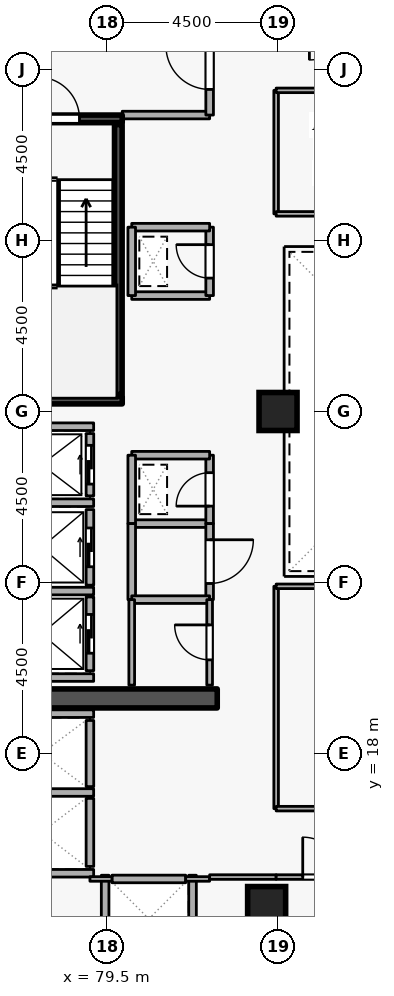
"""IFC4 building model, lengths in metres.
Left out: names, types, materials, properties, quantities, classifications, styles, units other than length and angle.
Written with IfcOpenShell. Run it as: python <this file> out.ifc"""

import sys

from ifc_helpers import new_model, si_unit, direction, frame, frame_2d, origin, origin_2d, place, context, subcontext, project, spatial, rectangle, extrude, element, fill, save


model = new_model("IFC4")
c1 = context("Model", 3, precision=1e-05, world=origin(), true_north=direction((0.0, 1.0)))
c2 = subcontext(c1, "Body", "Model", "MODEL_VIEW")
j1 = project(units=[si_unit("LENGTHUNIT", "METRE"), si_unit("PLANEANGLEUNIT", "RADIAN")], contexts=[c1])
p1 = place(None, origin())
s1 = spatial("IfcSite", under=j1, at=p1, CompositionType="ELEMENT")
p2 = place(p1, origin())
s2 = spatial("IfcBuilding", under=s1, at=p2, CompositionType="ELEMENT")
p3 = place(p2, frame((0.0, 0.0, 200.1)))
s3 = spatial("IfcBuildingStorey", under=s2, at=p3, CompositionType="ELEMENT", Elevation=200.1)
p4 = place(p3, frame((76.6, 19.45, 0.0), z_axis=(0.0, 0.0, 1.0), x_axis=(1.0, 0.0, 0.0)))
e1 = element("IfcWall", 1, at=p4, inside=s3, PredefinedType="SHEAR", context=c2, shape_type="SweptSolid", body=[
    extrude(rectangle(XDim=5.8, YDim=0.5, at=frame_2d((2.9, 0.0))), origin(), (0.0, 0.0, 1.0), 3.6),
])
for number, where, z_axis, x_axis in (
    (2, (83.7, 14.0, 0.0), (0.0, 0.0, 1.0), (1.0, 0.0, 0.0)),
    (3, (84.0, 27.0, 0.0), (0.0, 0.0, 1.0), (1.0, 0.0, 0.0)),
):
    element("IfcColumn", number, at=place(p3, frame(where, z_axis=z_axis, x_axis=x_axis)), inside=s3, PredefinedType="COLUMN", context=c2, shape_type="SweptSolid", body=[
        extrude(rectangle(XDim=1.0, YDim=1.0, at=origin_2d()), origin(), (0.0, 0.0, 1.0), 3.6),
    ])
p5 = place(p3, frame((79.05, 24.78, 0.0), z_axis=(0.0, 0.0, 1.0), x_axis=(0.0, 1.0, 0.0)))
e4 = element("IfcWall", 4, at=p5, inside=s3, PredefinedType="STANDARD", context=c2, shape_type="SweptSolid", body=[
    extrude(rectangle(XDim=1.64, YDim=0.2, at=frame_2d((0.82, 0.0))), origin(), (0.0, 0.0, 1.0), 3.32),
])
p6 = place(p5, frame((0.31, 0.0, 0.0)))
e5 = element("IfcOpeningElement", 5, at=p6, cuts=e4, PredefinedType="OPENING", context=c2, shape_type="SweptSolid", body=[
    extrude(rectangle(XDim=1.02, YDim=2.06, at=frame_2d((0.51, 1.03))), frame((0.0, 0.11, 0.0), z_axis=(0.0, -1.0, 0.0), x_axis=(1.0, 0.0, 0.0)), (0.0, 0.0, 1.0), 0.22),
])
p7 = place(p3, frame((79.05, 22.43, 0.0), z_axis=(0.0, 0.0, 1.0), x_axis=(0.0, 1.0, 0.0)))
e6 = element("IfcWall", 6, at=p7, inside=s3, PredefinedType="STANDARD", context=c2, shape_type="SweptSolid", body=[
    extrude(rectangle(XDim=1.99, YDim=0.2, at=frame_2d((0.995, 0.0))), origin(), (0.0, 0.0, 1.0), 3.32),
])
p8 = place(p7, frame((0.485, 0.0, 0.0)))
e7 = element("IfcOpeningElement", 7, at=p8, cuts=e6, PredefinedType="OPENING", context=c2, shape_type="SweptSolid", body=[
    extrude(rectangle(XDim=1.02, YDim=2.06, at=frame_2d((0.51, 1.03))), frame((0.0, 0.11, 0.0), z_axis=(0.0, -1.0, 0.0), x_axis=(1.0, 0.0, 0.0)), (0.0, 0.0, 1.0), 0.22),
])
p9 = place(p3, frame((79.05, 20.18, 0.0), z_axis=(0.0, 0.0, 1.0), x_axis=(0.0, 1.0, 0.0)))
e8 = element("IfcWall", 8, at=p9, inside=s3, PredefinedType="STANDARD", context=c2, shape_type="SweptSolid", body=[
    extrude(rectangle(XDim=1.94, YDim=0.2, at=frame_2d((0.97, 0.0))), origin(), (0.0, 0.0, 1.0), 3.32),
])
p10 = place(p9, frame((0.46, 0.0, 0.0)))
e9 = element("IfcOpeningElement", 9, at=p10, cuts=e8, PredefinedType="OPENING", context=c2, shape_type="SweptSolid", body=[
    extrude(rectangle(XDim=1.02, YDim=2.06, at=frame_2d((0.51, 1.03))), frame((0.0, 0.11, 0.0), z_axis=(0.0, -1.0, 0.0), x_axis=(1.0, 0.0, 0.0)), (0.0, 0.0, 1.0), 0.22),
])
p11 = place(p3, frame((79.05, 17.13, 0.0), z_axis=(0.0, 0.0, 1.0), x_axis=(0.0, 1.0, 0.0)))
e10 = element("IfcWall", 10, at=p11, inside=s3, PredefinedType="STANDARD", context=c2, shape_type="SweptSolid", body=[
    extrude(rectangle(XDim=1.74, YDim=0.2, at=frame_2d((0.87, 0.0))), origin(), (0.0, 0.0, 1.0), 3.32),
])
p12 = place(p3, frame((79.05, 15.03, 0.0), z_axis=(0.0, 0.0, 1.0), x_axis=(0.0, 1.0, 0.0)))
e11 = element("IfcWall", 11, at=p12, inside=s3, PredefinedType="STANDARD", context=c2, shape_type="SweptSolid", body=[
    extrude(rectangle(XDim=1.79, YDim=0.2, at=frame_2d((0.895, 0.0))), origin(), (0.0, 0.0, 1.0), 3.32),
])
p13 = place(p3, frame((79.63, 14.7, 0.0), z_axis=(0.0, 0.0, 1.0), x_axis=(1.0, 0.0, 0.0)))
e12 = element("IfcWall", 12, at=p13, inside=s3, PredefinedType="STANDARD", context=c2, shape_type="SweptSolid", body=[
    extrude(rectangle(XDim=1.94, YDim=0.2, at=frame_2d((0.97, 0.0))), origin(), (0.0, 0.0, 1.0), 3.32),
])
for number, where, z_axis, x_axis in (
    (13, (76.612, 26.6, 0.0), (0.0, 0.0, 1.0), (1.0, 0.0, 0.0)),
    (14, (76.612, 24.6, 0.0), (0.0, 0.0, 1.0), (1.0, 0.0, 0.0)),
    (15, (76.612, 22.275, 0.0), (0.0, 0.0, 1.0), (1.0, 0.0, 0.0)),
    (16, (76.612, 20.0, 0.0), (0.0, 0.0, 1.0), (1.0, 0.0, 0.0)),
):
    element("IfcWall", number, at=place(p3, frame(where, z_axis=z_axis, x_axis=x_axis)), inside=s3, PredefinedType="STANDARD", context=c2, shape_type="SweptSolid", body=[
        extrude(rectangle(XDim=2.536, YDim=0.2, at=frame_2d((1.268, 0.0))), origin(), (0.0, 0.0, 1.0), 3.32),
    ])
p14 = place(p3, frame((76.402, 19.05, 0.0), z_axis=(0.0, 0.0, 1.0), x_axis=(1.0, 0.0, 0.0)))
e17 = element("IfcWall", 17, at=p14, inside=s3, PredefinedType="STANDARD", context=c2, shape_type="SweptSolid", body=[
    extrude(rectangle(XDim=2.746, YDim=0.2, at=frame_2d((1.373, 0.0))), origin(), (0.0, 0.0, 1.0), 2.525),
])
p15 = place(p3, frame((76.402, 16.975, 0.0), z_axis=(0.0, 0.0, 1.0), x_axis=(1.0, 0.0, 0.0)))
e18 = element("IfcWall", 18, at=p15, inside=s3, PredefinedType="STANDARD", context=c2, shape_type="SweptSolid", body=[
    extrude(rectangle(XDim=2.746, YDim=0.2, at=frame_2d((1.373, 0.0))), origin(), (0.0, 0.0, 1.0), 3.32),
])
p16 = place(p3, frame((76.512, 14.85, 0.0), z_axis=(0.0, 0.0, 1.0), x_axis=(1.0, 0.0, 0.0)))
e19 = element("IfcWall", 19, at=p16, inside=s3, PredefinedType="STANDARD", context=c2, shape_type="SweptSolid", body=[
    extrude(rectangle(XDim=2.636, YDim=0.2, at=frame_2d((1.318, 0.0))), origin(), (0.0, 0.0, 1.0), 3.32),
])
for number, where, z_axis, x_axis in (
    (20, (81.75, 12.612, 0.0), (0.0, 0.0, 1.0), (0.0, 1.0, 0.0)),
    (21, (79.45, 12.612, 0.0), (0.0, 0.0, 1.0), (0.0, 1.0, 0.0)),
):
    element("IfcWall", number, at=place(p3, frame(where, z_axis=z_axis, x_axis=x_axis)), inside=s3, PredefinedType="STANDARD", context=c2, shape_type="SweptSolid", body=[
        extrude(rectangle(XDim=2.186, YDim=0.2, at=frame_2d((1.093, 0.0))), origin(), (0.0, 0.0, 1.0), 3.32),
    ])
p17 = place(p3, frame((76.55, 34.7, 0.0), z_axis=(0.0, 0.0, 1.0), x_axis=(1.0, 0.0, 0.0)))
e22 = element("IfcWall", 22, at=p17, inside=s3, PredefinedType="SHEAR", context=c2, shape_type="SweptSolid", body=[
    extrude(rectangle(XDim=3.35, YDim=0.2, at=frame_2d((1.675, 0.0))), origin(), (0.0, 0.0, 1.0), 3.6),
])
p18 = place(p17, frame((1.125, 0.0, 0.0)))
e23 = element("IfcOpeningElement", 23, at=p18, cuts=e22, PredefinedType="OPENING", context=c2, shape_type="SweptSolid", body=[
    extrude(rectangle(XDim=1.1, YDim=2.1, at=frame_2d((0.55, 1.05))), frame((0.0, 0.11, 0.0), z_axis=(0.0, -1.0, 0.0), x_axis=(1.0, 0.0, 0.0)), (0.0, 0.0, 1.0), 0.22),
])
p19 = place(p3, frame((79.9, 27.3, 0.0), z_axis=(0.0, 0.0, 1.0), x_axis=(-1.0, 0.0, 0.0)))
e24 = element("IfcWall", 24, at=p19, inside=s3, PredefinedType="SHEAR", context=c2, shape_type="SweptSolid", body=[
    extrude(rectangle(XDim=3.35, YDim=0.2, at=frame_2d((1.675, 0.0))), origin(), (0.0, 0.0, 1.0), 3.6),
])
p20 = place(p3, frame((79.797, 27.45, 0.0), z_axis=(0.0, 0.0, 1.0), x_axis=(0.0, 1.0, 0.0)))
e25 = element("IfcWall", 25, at=p20, inside=s3, PredefinedType="SHEAR", context=c2, shape_type="SweptSolid", body=[
    extrude(rectangle(XDim=7.1, YDim=0.2, at=frame_2d((3.55, 0.0))), origin(), (0.0, 0.0, 1.0), 3.6),
])
p21 = place(p3, frame((79.9, 34.8, 0.0), z_axis=(0.0, 0.0, 1.0), x_axis=(1.0, 0.0, 0.0)))
e26 = element("IfcWall", 26, at=p21, inside=s3, PredefinedType="STANDARD", context=c2, shape_type="SweptSolid", body=[
    extrude(rectangle(XDim=2.3, YDim=0.2, at=frame_2d((1.15, 0.0))), origin(), (0.0, 0.0, 1.0), 2.525),
])
p22 = place(p3, frame((82.2, 34.8, 0.0), z_axis=(0.0, 0.0, 1.0), x_axis=(0.0, 1.0, 0.0)))
e27 = element("IfcWall", 27, at=p22, inside=s3, PredefinedType="STANDARD", context=c2, shape_type="SweptSolid", body=[
    extrude(rectangle(XDim=2.5, YDim=0.2, at=frame_2d((1.25, 0.0))), origin(), (0.0, 0.0, 1.0), 3.32),
])
p23 = place(p22, frame((0.675, 0.0, 0.0)))
e28 = element("IfcOpeningElement", 28, at=p23, cuts=e27, PredefinedType="OPENING", context=c2, shape_type="SweptSolid", body=[
    extrude(rectangle(XDim=1.15, YDim=2.1, at=frame_2d((0.575, 1.05))), frame((0.0, 0.11, 0.0), z_axis=(0.0, -1.0, 0.0), x_axis=(1.0, 0.0, 0.0)), (0.0, 0.0, 1.0), 0.22),
])
p24 = place(p3, frame((80.15, 24.05, 0.0), z_axis=(0.0, 0.0, 1.0), x_axis=(1.0, 0.0, 0.0)))
e29 = element("IfcWall", 29, at=p24, inside=s3, PredefinedType="STANDARD", context=c2, shape_type="SweptSolid", body=[
    extrude(rectangle(XDim=2.05, YDim=0.2, at=frame_2d((1.025, 0.0))), origin(), (0.0, 0.0, 1.0), 3.32),
])
p25 = place(p3, frame((82.2, 24.05, 0.0), z_axis=(0.0, 0.0, 1.0), x_axis=(0.0, 1.0, 0.0)))
e30 = element("IfcWall", 30, at=p25, inside=s3, PredefinedType="STANDARD", context=c2, shape_type="SweptSolid", body=[
    extrude(rectangle(XDim=1.8, YDim=0.2, at=frame_2d((0.9, 0.0))), origin(), (0.0, 0.0, 1.0), 3.32),
])
p26 = place(p25, frame((0.46, 0.0, 0.0)))
e31 = element("IfcOpeningElement", 31, at=p26, cuts=e30, PredefinedType="OPENING", context=c2, shape_type="SweptSolid", body=[
    extrude(rectangle(XDim=0.88, YDim=2.04, at=frame_2d((0.44, 1.02))), frame((0.0, 0.11, 0.0), z_axis=(0.0, -1.0, 0.0), x_axis=(1.0, 0.0, 0.0)), (0.0, 0.0, 1.0), 0.22),
])
p27 = place(p3, frame((82.2, 25.85, 0.0), z_axis=(0.0, 0.0, 1.0), x_axis=(-1.0, 0.0, 0.0)))
e32 = element("IfcWall", 32, at=p27, inside=s3, PredefinedType="STANDARD", context=c2, shape_type="SweptSolid", body=[
    extrude(rectangle(XDim=2.05, YDim=0.2, at=frame_2d((1.025, 0.0))), origin(), (0.0, 0.0, 1.0), 3.32),
])
p28 = place(p3, frame((80.15, 25.85, 0.0), z_axis=(0.0, 0.0, 1.0), x_axis=(0.0, -1.0, 0.0)))
e33 = element("IfcWall", 33, at=p28, inside=s3, PredefinedType="STANDARD", context=c2, shape_type="SweptSolid", body=[
    extrude(rectangle(XDim=1.8, YDim=0.2, at=frame_2d((0.9, 0.0))), origin(), (0.0, 0.0, 1.0), 3.32),
])
p29 = place(p3, frame((80.15, 30.05, 0.0), z_axis=(0.0, 0.0, 1.0), x_axis=(1.0, 0.0, 0.0)))
e34 = element("IfcWall", 34, at=p29, inside=s3, PredefinedType="STANDARD", context=c2, shape_type="SweptSolid", body=[
    extrude(rectangle(XDim=2.05, YDim=0.2, at=frame_2d((1.025, 0.0))), origin(), (0.0, 0.0, 1.0), 3.32),
])
p30 = place(p3, frame((82.2, 30.05, 0.0), z_axis=(0.0, 0.0, 1.0), x_axis=(0.0, 1.0, 0.0)))
e35 = element("IfcWall", 35, at=p30, inside=s3, PredefinedType="STANDARD", context=c2, shape_type="SweptSolid", body=[
    extrude(rectangle(XDim=1.8, YDim=0.2, at=frame_2d((0.9, 0.0))), origin(), (0.0, 0.0, 1.0), 3.32),
])
p31 = place(p30, frame((0.46, 0.0, 0.0)))
e36 = element("IfcOpeningElement", 36, at=p31, cuts=e35, PredefinedType="OPENING", context=c2, shape_type="SweptSolid", body=[
    extrude(rectangle(XDim=0.88, YDim=2.04, at=frame_2d((0.44, 1.02))), frame((0.0, 0.11, 0.0), z_axis=(0.0, -1.0, 0.0), x_axis=(1.0, 0.0, 0.0)), (0.0, 0.0, 1.0), 0.22),
])
p32 = place(p3, frame((82.2, 31.85, 0.0), z_axis=(0.0, 0.0, 1.0), x_axis=(-1.0, 0.0, 0.0)))
e37 = element("IfcWall", 37, at=p32, inside=s3, PredefinedType="STANDARD", context=c2, shape_type="SweptSolid", body=[
    extrude(rectangle(XDim=2.05, YDim=0.2, at=frame_2d((1.025, 0.0))), origin(), (0.0, 0.0, 1.0), 3.32),
])
p33 = place(p3, frame((80.15, 31.85, 0.0), z_axis=(0.0, 0.0, 1.0), x_axis=(0.0, -1.0, 0.0)))
e38 = element("IfcWall", 38, at=p33, inside=s3, PredefinedType="STANDARD", context=c2, shape_type="SweptSolid", body=[
    extrude(rectangle(XDim=1.8, YDim=0.2, at=frame_2d((0.9, 0.0))), origin(), (0.0, 0.0, 1.0), 3.32),
])
p34 = place(p3, frame((80.15, 22.05, 0.0), z_axis=(0.0, 0.0, 1.0), x_axis=(0.0, 1.0, 0.0)))
e39 = element("IfcWall", 39, at=p34, inside=s3, PredefinedType="STANDARD", context=c2, shape_type="SweptSolid", body=[
    extrude(rectangle(XDim=2.0, YDim=0.2, at=frame_2d((1.0, 0.0))), origin(), (0.0, 0.0, 1.0), 3.32),
])
p35 = place(p3, frame((82.2, 24.05, 0.0), z_axis=(0.0, 0.0, 1.0), x_axis=(0.0, -1.0, 0.0)))
e40 = element("IfcWall", 40, at=p35, inside=s3, PredefinedType="STANDARD", context=c2, shape_type="SweptSolid", body=[
    extrude(rectangle(XDim=2.0, YDim=0.2, at=frame_2d((1.0, 0.0))), origin(), (0.0, 0.0, 1.0), 3.32),
])
p36 = place(p35, frame((0.425, 0.0, 0.0)))
e41 = element("IfcOpeningElement", 41, at=p36, cuts=e40, PredefinedType="OPENING", context=c2, shape_type="SweptSolid", body=[
    extrude(rectangle(XDim=1.15, YDim=2.1, at=frame_2d((0.575, 1.05))), frame((0.0, 0.11, 0.0), z_axis=(0.0, -1.0, 0.0), x_axis=(1.0, 0.0, 0.0)), (0.0, 0.0, 1.0), 0.22),
])
p37 = place(p3, frame((82.2, 22.05, 0.0), z_axis=(0.0, 0.0, 1.0), x_axis=(-1.0, 0.0, 0.0)))
e42 = element("IfcWall", 42, at=p37, inside=s3, PredefinedType="STANDARD", context=c2, shape_type="SweptSolid", body=[
    extrude(rectangle(XDim=2.05, YDim=0.2, at=frame_2d((1.025, 0.0))), origin(), (0.0, 0.0, 1.0), 3.32),
])
p38 = place(p3, frame((82.2, 19.8, 0.0), z_axis=(0.0, 0.0, 1.0), x_axis=(0.0, 1.0, 0.0)))
e43 = element("IfcWall", 43, at=p38, inside=s3, PredefinedType="PARTITIONING", context=c2, shape_type="SweptSolid", body=[
    extrude(rectangle(XDim=2.25, YDim=0.15, at=frame_2d((1.125, 0.0))), origin(), (0.0, 0.0, 1.0), 3.32),
])
p39 = place(p38, frame((0.665, 0.0, 0.0)))
e44 = element("IfcOpeningElement", 44, at=p39, cuts=e43, PredefinedType="OPENING", context=c2, shape_type="SweptSolid", body=[
    extrude(rectangle(XDim=0.92, YDim=2.08, at=frame_2d((0.46, 1.04))), frame((0.0, 0.085, 0.0), z_axis=(0.0, -1.0, 0.0), x_axis=(1.0, 0.0, 0.0)), (0.0, 0.0, 1.0), 0.17),
])
p40 = place(p3, frame((80.15, 22.05, 0.0), z_axis=(0.0, 0.0, 1.0), x_axis=(0.0, -1.0, 0.0)))
e45 = element("IfcWall", 45, at=p40, inside=s3, PredefinedType="PARTITIONING", context=c2, shape_type="SweptSolid", body=[
    extrude(rectangle(XDim=2.25, YDim=0.15, at=frame_2d((1.125, 0.0))), origin(), (0.0, 0.0, 1.0), 3.32),
])
p41 = place(p3, frame((79.05, 14.7, 0.0), z_axis=(0.0, 0.0, 1.0), x_axis=(1.0, 0.0, 0.0)))
e46 = element("IfcWall", 46, at=p41, inside=s3, PredefinedType="PARTITIONING", context=c2, shape_type="SweptSolid", body=[
    extrude(rectangle(XDim=0.58, YDim=0.12, at=frame_2d((0.29, 0.0))), origin(), (0.0, 0.0, 1.0), 3.32),
])
p42 = place(p3, frame((81.57, 14.7, 0.0), z_axis=(0.0, 0.0, 1.0), x_axis=(1.0, 0.0, 0.0)))
e47 = element("IfcWall", 47, at=p42, inside=s3, PredefinedType="PARTITIONING", context=c2, shape_type="SweptSolid", body=[
    extrude(rectangle(XDim=0.63, YDim=0.12, at=frame_2d((0.315, 0.0))), origin(), (0.0, 0.0, 1.0), 3.32),
])
p43 = place(p3, frame((82.2, 14.75, 0.0), z_axis=(0.0, 0.0, 1.0), x_axis=(1.0, 0.0, 0.0)))
e48 = element("IfcWall", 48, at=p43, inside=s3, PredefinedType="PARTITIONING", context=c2, shape_type="SweptSolid", body=[
    extrude(rectangle(XDim=1.75, YDim=0.12, at=frame_2d((0.875, 0.0))), origin(), (0.0, 0.0, 1.0), 3.32),
])
p44 = place(p3, frame((83.95, 14.75, 0.0), z_axis=(0.0, 0.0, 1.0), x_axis=(1.0, 0.0, 0.0)))
e49 = element("IfcWall", 49, at=p44, inside=s3, PredefinedType="PARTITIONING", context=c2, shape_type="SweptSolid", body=[
    extrude(rectangle(XDim=2.45, YDim=0.12, at=frame_2d((1.225, 0.0))), origin(), (0.0, 0.0, 1.0), 3.32),
])
p45 = place(p44, frame((0.7, 0.0, 0.0)))
e50 = element("IfcOpeningElement", 50, at=p45, cuts=e49, PredefinedType="OPENING", context=c2, shape_type="SweptSolid", body=[
    extrude(rectangle(XDim=1.05, YDim=2.1, at=frame_2d((0.525, 1.05))), frame((0.0, 0.07, 0.0), z_axis=(0.0, -1.0, 0.0), x_axis=(1.0, 0.0, 0.0)), (0.0, 0.0, 1.0), 0.14),
])
p46 = place(p3, frame((83.95, 16.55, 0.0), z_axis=(0.0, 0.0, 1.0), x_axis=(0.0, 1.0, 0.0)))
e51 = element("IfcWall", 51, at=p46, inside=s3, PredefinedType="PARTITIONING", context=c2, shape_type="SweptSolid", body=[
    extrude(rectangle(XDim=5.85, YDim=0.12, at=frame_2d((2.925, 0.0))), origin(), (0.0, 0.0, 1.0), 3.32),
])
p47 = place(p3, frame((83.95, 22.4, 0.0), z_axis=(0.0, 0.0, 1.0), x_axis=(1.0, 0.0, 0.0)))
e52 = element("IfcWall", 52, at=p47, inside=s3, PredefinedType="PARTITIONING", context=c2, shape_type="SweptSolid", body=[
    extrude(rectangle(XDim=9.1, YDim=0.12, at=frame_2d((4.55, 0.0))), origin(), (0.0, 0.0, 1.0), 3.32),
])
p48 = place(p3, frame((93.05, 16.55, 0.0), z_axis=(0.0, 0.0, 1.0), x_axis=(-1.0, 0.0, 0.0)))
e53 = element("IfcWall", 53, at=p48, inside=s3, PredefinedType="PARTITIONING", context=c2, shape_type="SweptSolid", body=[
    extrude(rectangle(XDim=9.1, YDim=0.12, at=frame_2d((4.55, 0.0))), origin(), (0.0, 0.0, 1.0), 3.32),
])
p49 = place(p48, frame((4.075, 0.0, 0.0)))
e54 = element("IfcOpeningElement", 54, at=p49, cuts=e53, PredefinedType="OPENING", context=c2, shape_type="SweptSolid", body=[
    extrude(rectangle(XDim=0.95, YDim=2.1, at=frame_2d((0.475, 1.05))), frame((0.0, 0.07, 0.0), z_axis=(0.0, -1.0, 0.0), x_axis=(1.0, 0.0, 0.0)), (0.0, 0.0, 1.0), 0.14),
])
p50 = place(p3, frame((83.95, 32.2, 0.0), z_axis=(0.0, 0.0, 1.0), x_axis=(0.0, 1.0, 0.0)))
e55 = element("IfcWall", 55, at=p50, inside=s3, PredefinedType="PARTITIONING", context=c2, shape_type="SweptSolid", body=[
    extrude(rectangle(XDim=3.25, YDim=0.12, at=frame_2d((1.625, 0.0))), origin(), (0.0, 0.0, 1.0), 3.32),
])
p51 = place(p3, frame((83.95, 35.45, 0.0), z_axis=(0.0, 0.0, 1.0), x_axis=(1.0, 0.0, 0.0)))
e56 = element("IfcWall", 56, at=p51, inside=s3, PredefinedType="PARTITIONING", context=c2, shape_type="SweptSolid", body=[
    extrude(rectangle(XDim=9.1, YDim=0.12, at=frame_2d((4.55, 0.0))), origin(), (0.0, 0.0, 1.0), 3.32),
])
p52 = place(p51, frame((4.075, 0.0, 0.0)))
e57 = element("IfcOpeningElement", 57, at=p52, cuts=e56, PredefinedType="OPENING", context=c2, shape_type="SweptSolid", body=[
    extrude(rectangle(XDim=0.95, YDim=2.1, at=frame_2d((0.475, 1.05))), frame((0.0, 0.07, 0.0), z_axis=(0.0, -1.0, 0.0), x_axis=(1.0, 0.0, 0.0)), (0.0, 0.0, 1.0), 0.14),
])
p53 = place(p3, frame((93.05, 32.2, 0.0), z_axis=(0.0, 0.0, 1.0), x_axis=(-1.0, 0.0, 0.0)))
e58 = element("IfcWall", 58, at=p53, inside=s3, PredefinedType="PARTITIONING", context=c2, shape_type="SweptSolid", body=[
    extrude(rectangle(XDim=9.1, YDim=0.12, at=frame_2d((4.55, 0.0))), origin(), (0.0, 0.0, 1.0), 3.32),
])
p54 = place(p6, origin())
e59 = element("IfcDoor", 59, at=p54, inside=s3, OperationType="SLIDING_TO_LEFT", PredefinedType="DOOR", context=c2, shape_type="SweptSolid", body=[
    extrude(rectangle(XDim=1.02, YDim=2.06, at=frame_2d((0.51, 1.03))), frame((0.0, 0.025, 0.0), z_axis=(0.0, -1.0, 0.0), x_axis=(1.0, 0.0, 0.0)), (0.0, 0.0, 1.0), 0.05),
])
fill(e5, e59)
p55 = place(p8, origin())
e60 = element("IfcDoor", 60, at=p55, inside=s3, OperationType="SLIDING_TO_LEFT", PredefinedType="DOOR", context=c2, shape_type="SweptSolid", body=[
    extrude(rectangle(XDim=1.02, YDim=2.06, at=frame_2d((0.51, 1.03))), frame((0.0, 0.025, 0.0), z_axis=(0.0, -1.0, 0.0), x_axis=(1.0, 0.0, 0.0)), (0.0, 0.0, 1.0), 0.05),
])
fill(e7, e60)
p56 = place(p10, origin())
e61 = element("IfcDoor", 61, at=p56, inside=s3, OperationType="SLIDING_TO_LEFT", PredefinedType="DOOR", context=c2, shape_type="SweptSolid", body=[
    extrude(rectangle(XDim=1.02, YDim=2.06, at=frame_2d((0.51, 1.03))), frame((0.0, 0.025, 0.0), z_axis=(0.0, -1.0, 0.0), x_axis=(1.0, 0.0, 0.0)), (0.0, 0.0, 1.0), 0.05),
])
fill(e9, e61)
p57 = place(p18, origin())
e62 = element("IfcDoor", 62, at=p57, inside=s3, OperationType="SINGLE_SWING_LEFT", PredefinedType="DOOR", context=c2, shape_type="SweptSolid", body=[
    extrude(rectangle(XDim=1.1, YDim=2.1, at=frame_2d((0.55, 1.05))), frame((0.0, 0.025, 0.0), z_axis=(0.0, -1.0, 0.0), x_axis=(1.0, 0.0, 0.0)), (0.0, 0.0, 1.0), 0.05),
])
fill(e23, e62)
p58 = place(p23, origin())
e63 = element("IfcDoor", 63, at=p58, inside=s3, OperationType="SINGLE_SWING_RIGHT", PredefinedType="DOOR", context=c2, shape_type="SweptSolid", body=[
    extrude(rectangle(XDim=1.15, YDim=2.1, at=frame_2d((0.575, 1.05))), frame((0.0, 0.025, 0.0), z_axis=(0.0, -1.0, 0.0), x_axis=(1.0, 0.0, 0.0)), (0.0, 0.0, 1.0), 0.05),
])
fill(e28, e63)
p59 = place(p26, origin())
e64 = element("IfcDoor", 64, at=p59, inside=s3, OperationType="SINGLE_SWING_LEFT", PredefinedType="DOOR", context=c2, shape_type="SweptSolid", body=[
    extrude(rectangle(XDim=0.88, YDim=2.04, at=frame_2d((0.44, 1.02))), frame((0.0, 0.025, 0.0), z_axis=(0.0, -1.0, 0.0), x_axis=(1.0, 0.0, 0.0)), (0.0, 0.0, 1.0), 0.05),
])
fill(e31, e64)
p60 = place(p31, origin())
e65 = element("IfcDoor", 65, at=p60, inside=s3, OperationType="SINGLE_SWING_RIGHT", PredefinedType="DOOR", context=c2, shape_type="SweptSolid", body=[
    extrude(rectangle(XDim=0.88, YDim=2.04, at=frame_2d((0.44, 1.02))), frame((0.0, 0.025, 0.0), z_axis=(0.0, -1.0, 0.0), x_axis=(1.0, 0.0, 0.0)), (0.0, 0.0, 1.0), 0.05),
])
fill(e36, e65)
p61 = place(p39, origin())
e66 = element("IfcDoor", 66, at=p61, inside=s3, OperationType="SINGLE_SWING_RIGHT", PredefinedType="DOOR", context=c2, shape_type="SweptSolid", body=[
    extrude(rectangle(XDim=0.92, YDim=2.08, at=frame_2d((0.46, 1.04))), frame((0.0, 0.025, 0.0), z_axis=(0.0, -1.0, 0.0), x_axis=(1.0, 0.0, 0.0)), (0.0, 0.0, 1.0), 0.05),
])
fill(e44, e66)
p62 = place(p36, origin())
e67 = element("IfcDoor", 67, at=p62, inside=s3, OperationType="SINGLE_SWING_LEFT", PredefinedType="DOOR", context=c2, shape_type="SweptSolid", body=[
    extrude(rectangle(XDim=1.15, YDim=2.1, at=frame_2d((0.575, 1.05))), frame((0.0, 0.025, 0.0), z_axis=(0.0, -1.0, 0.0), x_axis=(1.0, 0.0, 0.0)), (0.0, 0.0, 1.0), 0.05),
])
fill(e41, e67)
p63 = place(p45, origin())
e68 = element("IfcDoor", 68, at=p63, inside=s3, OperationType="SINGLE_SWING_LEFT", PredefinedType="DOOR", context=c2, shape_type="SweptSolid", body=[
    extrude(rectangle(XDim=1.05, YDim=2.1, at=frame_2d((0.525, 1.05))), frame((0.0, 0.025, 0.0), z_axis=(0.0, -1.0, 0.0), x_axis=(1.0, 0.0, 0.0)), (0.0, 0.0, 1.0), 0.05),
])
fill(e50, e68)
save(model, sys.argv[1])
